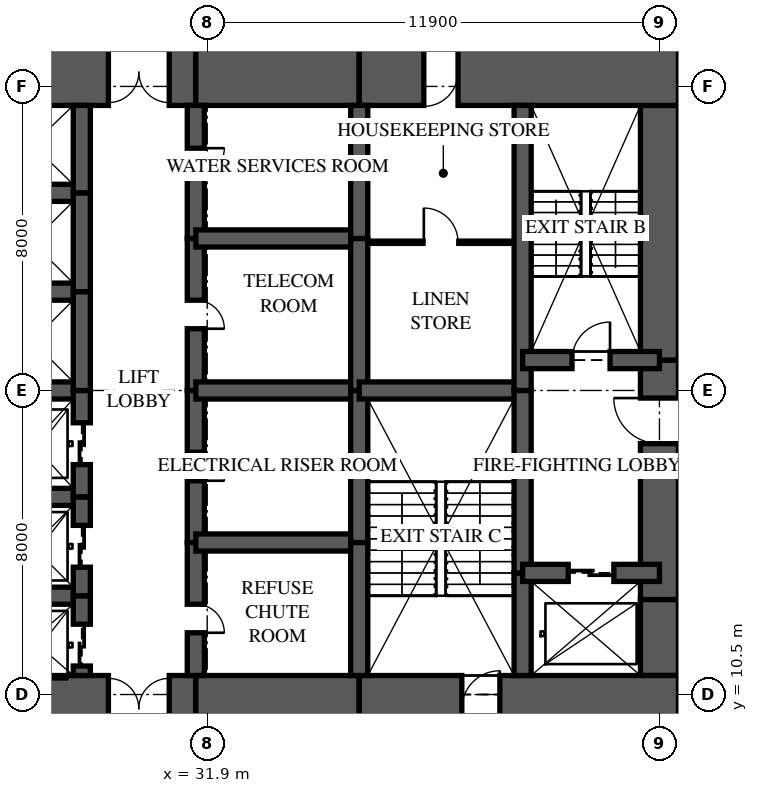
"""IFC4 building model, lengths in metres.
Left out: names, types, materials, properties, quantities, classifications, styles, units other than length and angle.
Written with IfcOpenShell. Run it as: python <this file> out.ifc"""

import sys

from ifc_helpers import new_model, si_unit, direction, frame, frame_2d, origin, place, context, subcontext, project, spatial, rectangle, extrude, element, fill, save


model = new_model("IFC4")
c1 = context("Model", 3, precision=1e-05, world=origin(), true_north=direction((0.0, 1.0)))
c2 = subcontext(c1, "Body", "Model", "MODEL_VIEW")
j1 = project(units=[si_unit("LENGTHUNIT", "METRE"), si_unit("PLANEANGLEUNIT", "RADIAN")], contexts=[c1])
p1 = place(None, origin())
s1 = spatial("IfcSite", under=j1, at=p1, CompositionType="ELEMENT")
p2 = place(p1, origin())
s2 = spatial("IfcBuilding", under=s1, at=p2, CompositionType="ELEMENT")
p3 = place(p2, frame((0.0, 0.0, 11.0)))
s3 = spatial("IfcBuildingStorey", under=s2, at=p3, CompositionType="ELEMENT", Elevation=11.0)
p4 = place(p3, frame((26.0, 10.125, 0.0), z_axis=(0.0, 0.0, 1.0), x_axis=(1.0, 0.0, 0.0)))
e1 = element("IfcWall", 1, at=p4, inside=s3, PredefinedType="SHEAR", context=c2, shape_type="SweptSolid", body=[
    extrude(rectangle(XDim=5.6, YDim=1.75, at=frame_2d((2.8, 0.0))), origin(), (0.0, 0.0, 1.0), 5.0),
])
p5 = place(p4, frame((3.3, 0.0, 0.0)))
e2 = element("IfcOpeningElement", 2, at=p5, cuts=e1, PredefinedType="OPENING", context=c2, shape_type="SweptSolid", body=[
    extrude(rectangle(XDim=1.6, YDim=2.1, at=frame_2d((0.8, 1.05))), frame((0.0, 0.885, 0.0), z_axis=(0.0, -1.0, 0.0), x_axis=(1.0, 0.0, 0.0)), (0.0, 0.0, 1.0), 1.77),
])
p6 = place(p3, frame((31.6, 10.125, 0.0), z_axis=(0.0, 0.0, 1.0), x_axis=(1.0, 0.0, 0.0)))
e3 = element("IfcWall", 3, at=p6, inside=s3, PredefinedType="SHEAR", context=c2, shape_type="SweptSolid", body=[
    extrude(rectangle(XDim=4.3, YDim=1.75, at=frame_2d((2.15, 0.0))), origin(), (0.0, 0.0, 1.0), 5.0),
])
p7 = place(p3, frame((35.9, 10.125, 0.0), z_axis=(0.0, 0.0, 1.0), x_axis=(1.0, 0.0, 0.0)))
e4 = element("IfcWall", 4, at=p7, inside=s3, PredefinedType="SHEAR", context=c2, shape_type="SweptSolid", body=[
    extrude(rectangle(XDim=8.4, YDim=1.75, at=frame_2d((4.2, 0.0))), origin(), (0.0, 0.0, 1.0), 5.0),
])
p8 = place(p7, frame((2.7, 0.0, 0.0)))
e5 = element("IfcOpeningElement", 5, at=p8, cuts=e4, PredefinedType="OPENING", context=c2, shape_type="SweptSolid", body=[
    extrude(rectangle(XDim=1.0, YDim=2.1, at=frame_2d((0.5, 1.05))), frame((0.0, 0.885, 0.0), z_axis=(0.0, -1.0, 0.0), x_axis=(1.0, 0.0, 0.0)), (0.0, 0.0, 1.0), 1.77),
])
p9 = place(p3, frame((44.3, 26.875, 0.0), z_axis=(0.0, 0.0, 1.0), x_axis=(-1.0, 0.0, 0.0)))
e6 = element("IfcWall", 6, at=p9, inside=s3, PredefinedType="SHEAR", context=c2, shape_type="SweptSolid", body=[
    extrude(rectangle(XDim=8.4, YDim=1.75, at=frame_2d((4.2, 0.0))), origin(), (0.0, 0.0, 1.0), 5.0),
])
p10 = place(p9, frame((5.8, 0.0, 0.0)))
e7 = element("IfcOpeningElement", 7, at=p10, cuts=e6, PredefinedType="OPENING", context=c2, shape_type="SweptSolid", body=[
    extrude(rectangle(XDim=0.9, YDim=2.1, at=frame_2d((0.45, 1.05))), frame((0.0, 0.885, 0.0), z_axis=(0.0, -1.0, 0.0), x_axis=(1.0, 0.0, 0.0)), (0.0, 0.0, 1.0), 1.77),
])
p11 = place(p3, frame((35.9, 26.875, 0.0), z_axis=(0.0, 0.0, 1.0), x_axis=(-1.0, 0.0, 0.0)))
e8 = element("IfcWall", 8, at=p11, inside=s3, PredefinedType="SHEAR", context=c2, shape_type="SweptSolid", body=[
    extrude(rectangle(XDim=4.3, YDim=1.75, at=frame_2d((2.15, 0.0))), origin(), (0.0, 0.0, 1.0), 5.0),
])
p12 = place(p3, frame((31.6, 26.875, 0.0), z_axis=(0.0, 0.0, 1.0), x_axis=(-1.0, 0.0, 0.0)))
e9 = element("IfcWall", 9, at=p12, inside=s3, PredefinedType="SHEAR", context=c2, shape_type="SweptSolid", body=[
    extrude(rectangle(XDim=5.6, YDim=1.75, at=frame_2d((2.8, 0.0))), origin(), (0.0, 0.0, 1.0), 5.0),
])
p13 = place(p12, frame((0.7, 0.0, 0.0)))
e10 = element("IfcOpeningElement", 10, at=p13, cuts=e9, PredefinedType="OPENING", context=c2, shape_type="SweptSolid", body=[
    extrude(rectangle(XDim=1.6, YDim=2.1, at=frame_2d((0.8, 1.05))), frame((0.0, 0.885, 0.0), z_axis=(0.0, -1.0, 0.0), x_axis=(1.0, 0.0, 0.0)), (0.0, 0.0, 1.0), 1.77),
])
p14 = place(p3, frame((43.8, 11.0, 0.0), z_axis=(0.0, 0.0, 1.0), x_axis=(0.0, 1.0, 0.0)))
e11 = element("IfcWall", 11, at=p14, inside=s3, PredefinedType="SHEAR", context=c2, shape_type="SweptSolid", body=[
    extrude(rectangle(XDim=2.0, YDim=1.0, at=frame_2d((1.0, 0.0))), origin(), (0.0, 0.0, 1.0), 5.0),
])
p15 = place(p3, frame((43.8, 13.0, 0.0), z_axis=(0.0, 0.0, 1.0), x_axis=(0.0, 1.0, 0.0)))
e12 = element("IfcWall", 12, at=p15, inside=s3, PredefinedType="SHEAR", context=c2, shape_type="SweptSolid", body=[
    extrude(rectangle(XDim=6.3, YDim=1.0, at=frame_2d((3.15, 0.0))), origin(), (0.0, 0.0, 1.0), 5.0),
])
p16 = place(p15, frame((4.1, 0.0, 0.0)))
e13 = element("IfcOpeningElement", 13, at=p16, cuts=e12, PredefinedType="OPENING", context=c2, shape_type="SweptSolid", body=[
    extrude(rectangle(XDim=1.2, YDim=2.2, at=frame_2d((0.6, 1.1))), frame((0.0, 0.51, 0.0), z_axis=(0.0, -1.0, 0.0), x_axis=(1.0, 0.0, 0.0)), (0.0, 0.0, 1.0), 1.02),
])
p17 = place(p3, frame((43.8, 19.3, 0.0), z_axis=(0.0, 0.0, 1.0), x_axis=(0.0, 1.0, 0.0)))
e14 = element("IfcWall", 14, at=p17, inside=s3, PredefinedType="SHEAR", context=c2, shape_type="SweptSolid", body=[
    extrude(rectangle(XDim=6.7, YDim=1.0, at=frame_2d((3.35, 0.0))), origin(), (0.0, 0.0, 1.0), 5.0),
])
p18 = place(p3, frame((28.6, 11.0, 0.0), z_axis=(0.0, 0.0, 1.0), x_axis=(0.0, 1.0, 0.0)))
e15 = element("IfcWall", 15, at=p18, inside=s3, PredefinedType="SHEAR", context=c2, shape_type="SweptSolid", body=[
    extrude(rectangle(XDim=2.1, YDim=0.45, at=frame_2d((1.05, 0.0))), origin(), (0.0, 0.0, 1.0), 5.0),
])
p19 = place(p18, frame((0.25, 0.0, 0.0)))
e16 = element("IfcOpeningElement", 16, at=p19, cuts=e15, PredefinedType="OPENING", context=c2, shape_type="SweptSolid", body=[
    extrude(rectangle(XDim=1.1, YDim=2.1, at=frame_2d((0.55, 1.05))), frame((0.0, 0.235, 0.0), z_axis=(0.0, -1.0, 0.0), x_axis=(1.0, 0.0, 0.0)), (0.0, 0.0, 1.0), 0.47),
])
p20 = place(p3, frame((28.6, 13.1, 0.0), z_axis=(0.0, 0.0, 1.0), x_axis=(0.0, 1.0, 0.0)))
e17 = element("IfcWall", 17, at=p20, inside=s3, PredefinedType="SHEAR", context=c2, shape_type="SweptSolid", body=[
    extrude(rectangle(XDim=2.6, YDim=0.45, at=frame_2d((1.3, 0.0))), origin(), (0.0, 0.0, 1.0), 5.0),
])
p21 = place(p20, frame((0.75, 0.0, 0.0)))
e18 = element("IfcOpeningElement", 18, at=p21, cuts=e17, PredefinedType="OPENING", context=c2, shape_type="SweptSolid", body=[
    extrude(rectangle(XDim=1.1, YDim=2.1, at=frame_2d((0.55, 1.05))), frame((0.0, 0.235, 0.0), z_axis=(0.0, -1.0, 0.0), x_axis=(1.0, 0.0, 0.0)), (0.0, 0.0, 1.0), 0.47),
])
p22 = place(p3, frame((28.6, 15.7, 0.0), z_axis=(0.0, 0.0, 1.0), x_axis=(0.0, 1.0, 0.0)))
e19 = element("IfcWall", 19, at=p22, inside=s3, PredefinedType="SHEAR", context=c2, shape_type="SweptSolid", body=[
    extrude(rectangle(XDim=2.8, YDim=0.45, at=frame_2d((1.4, 0.0))), origin(), (0.0, 0.0, 1.0), 5.0),
])
p23 = place(p22, frame((0.85, 0.0, 0.0)))
e20 = element("IfcOpeningElement", 20, at=p23, cuts=e19, PredefinedType="OPENING", context=c2, shape_type="SweptSolid", body=[
    extrude(rectangle(XDim=1.1, YDim=2.1, at=frame_2d((0.55, 1.05))), frame((0.0, 0.235, 0.0), z_axis=(0.0, -1.0, 0.0), x_axis=(1.0, 0.0, 0.0)), (0.0, 0.0, 1.0), 0.47),
])
p24 = place(p3, frame((28.6, 18.5, 0.0), z_axis=(0.0, 0.0, 1.0), x_axis=(0.0, 1.0, 0.0)))
e21 = element("IfcWall", 21, at=p24, inside=s3, PredefinedType="SHEAR", context=c2, shape_type="SweptSolid", body=[
    extrude(rectangle(XDim=2.6, YDim=0.45, at=frame_2d((1.3, 0.0))), origin(), (0.0, 0.0, 1.0), 5.0),
])
p25 = place(p3, frame((28.6, 21.1, 0.0), z_axis=(0.0, 0.0, 1.0), x_axis=(0.0, 1.0, 0.0)))
e22 = element("IfcWall", 22, at=p25, inside=s3, PredefinedType="SHEAR", context=c2, shape_type="SweptSolid", body=[
    extrude(rectangle(XDim=2.6, YDim=0.45, at=frame_2d((1.3, 0.0))), origin(), (0.0, 0.0, 1.0), 5.0),
])
p26 = place(p3, frame((28.6, 23.7, 0.0), z_axis=(0.0, 0.0, 1.0), x_axis=(0.0, 1.0, 0.0)))
e23 = element("IfcWall", 23, at=p26, inside=s3, PredefinedType="SHEAR", context=c2, shape_type="SweptSolid", body=[
    extrude(rectangle(XDim=2.3, YDim=0.45, at=frame_2d((1.15, 0.0))), origin(), (0.0, 0.0, 1.0), 5.0),
])
p27 = place(p3, frame((31.6, 11.0, 0.0), z_axis=(0.0, 0.0, 1.0), x_axis=(0.0, 1.0, 0.0)))
e24 = element("IfcWall", 24, at=p27, inside=s3, PredefinedType="SHEAR", context=c2, shape_type="SweptSolid", body=[
    extrude(rectangle(XDim=3.5, YDim=0.45, at=frame_2d((1.75, 0.0))), origin(), (0.0, 0.0, 1.0), 5.0),
])
p28 = place(p27, frame((1.125, 0.0, 0.0)))
e25 = element("IfcOpeningElement", 25, at=p28, cuts=e24, PredefinedType="OPENING", context=c2, shape_type="SweptSolid", body=[
    extrude(rectangle(XDim=0.75, YDim=2.1, at=frame_2d((0.375, 1.05))), frame((0.0, 0.235, 0.0), z_axis=(0.0, -1.0, 0.0), x_axis=(1.0, 0.0, 0.0)), (0.0, 0.0, 1.0), 0.47),
])
p29 = place(p3, frame((31.6, 14.5, 0.0), z_axis=(0.0, 0.0, 1.0), x_axis=(0.0, 1.0, 0.0)))
e26 = element("IfcWall", 26, at=p29, inside=s3, PredefinedType="SHEAR", context=c2, shape_type="SweptSolid", body=[
    extrude(rectangle(XDim=4.0, YDim=0.45, at=frame_2d((2.0, 0.0))), origin(), (0.0, 0.0, 1.0), 5.0),
])
p30 = place(p29, frame((1.625, 0.0, 0.0)))
e27 = element("IfcOpeningElement", 27, at=p30, cuts=e26, PredefinedType="OPENING", context=c2, shape_type="SweptSolid", body=[
    extrude(rectangle(XDim=0.75, YDim=2.1, at=frame_2d((0.375, 1.05))), frame((0.0, 0.235, 0.0), z_axis=(0.0, -1.0, 0.0), x_axis=(1.0, 0.0, 0.0)), (0.0, 0.0, 1.0), 0.47),
])
p31 = place(p3, frame((31.6, 18.5, 0.0), z_axis=(0.0, 0.0, 1.0), x_axis=(0.0, 1.0, 0.0)))
e28 = element("IfcWall", 28, at=p31, inside=s3, PredefinedType="SHEAR", context=c2, shape_type="SweptSolid", body=[
    extrude(rectangle(XDim=4.0, YDim=0.45, at=frame_2d((2.0, 0.0))), origin(), (0.0, 0.0, 1.0), 5.0),
])
p32 = place(p31, frame((1.625, 0.0, 0.0)))
e29 = element("IfcOpeningElement", 29, at=p32, cuts=e28, PredefinedType="OPENING", context=c2, shape_type="SweptSolid", body=[
    extrude(rectangle(XDim=0.75, YDim=2.1, at=frame_2d((0.375, 1.05))), frame((0.0, 0.235, 0.0), z_axis=(0.0, -1.0, 0.0), x_axis=(1.0, 0.0, 0.0)), (0.0, 0.0, 1.0), 0.47),
])
p33 = place(p3, frame((31.6, 22.5, 0.0), z_axis=(0.0, 0.0, 1.0), x_axis=(0.0, 1.0, 0.0)))
e30 = element("IfcWall", 30, at=p33, inside=s3, PredefinedType="SHEAR", context=c2, shape_type="SweptSolid", body=[
    extrude(rectangle(XDim=3.5, YDim=0.45, at=frame_2d((1.75, 0.0))), origin(), (0.0, 0.0, 1.0), 5.0),
])
p34 = place(p33, frame((1.625, 0.0, 0.0)))
e31 = element("IfcOpeningElement", 31, at=p34, cuts=e30, PredefinedType="OPENING", context=c2, shape_type="SweptSolid", body=[
    extrude(rectangle(XDim=0.75, YDim=2.1, at=frame_2d((0.375, 1.05))), frame((0.0, 0.235, 0.0), z_axis=(0.0, -1.0, 0.0), x_axis=(1.0, 0.0, 0.0)), (0.0, 0.0, 1.0), 0.47),
])
p35 = place(p3, frame((35.9, 11.0, 0.0), z_axis=(0.0, 0.0, 1.0), x_axis=(0.0, 1.0, 0.0)))
e32 = element("IfcWall", 32, at=p35, inside=s3, PredefinedType="SHEAR", context=c2, shape_type="SweptSolid", body=[
    extrude(rectangle(XDim=3.5, YDim=0.45, at=frame_2d((1.75, 0.0))), origin(), (0.0, 0.0, 1.0), 5.0),
])
for number, where, z_axis, x_axis in (
    (33, (35.9, 14.5, 0.0), (0.0, 0.0, 1.0), (0.0, 1.0, 0.0)),
    (34, (35.9, 18.5, 0.0), (0.0, 0.0, 1.0), (0.0, 1.0, 0.0)),
):
    element("IfcWall", number, at=place(p3, frame(where, z_axis=z_axis, x_axis=x_axis)), inside=s3, PredefinedType="SHEAR", context=c2, shape_type="SweptSolid", body=[
        extrude(rectangle(XDim=4.0, YDim=0.45, at=frame_2d((2.0, 0.0))), origin(), (0.0, 0.0, 1.0), 5.0),
    ])
p36 = place(p3, frame((35.9, 22.5, 0.0), z_axis=(0.0, 0.0, 1.0), x_axis=(0.0, 1.0, 0.0)))
e35 = element("IfcWall", 35, at=p36, inside=s3, PredefinedType="SHEAR", context=c2, shape_type="SweptSolid", body=[
    extrude(rectangle(XDim=3.5, YDim=0.45, at=frame_2d((1.75, 0.0))), origin(), (0.0, 0.0, 1.0), 5.0),
])
p37 = place(p3, frame((40.2, 11.0, 0.0), z_axis=(0.0, 0.0, 1.0), x_axis=(0.0, 1.0, 0.0)))
e36 = element("IfcWall", 36, at=p37, inside=s3, PredefinedType="SHEAR", context=c2, shape_type="SweptSolid", body=[
    extrude(rectangle(XDim=2.7, YDim=0.45, at=frame_2d((1.35, 0.0))), origin(), (0.0, 0.0, 1.0), 5.0),
])
p38 = place(p3, frame((40.2, 13.7, 0.0), z_axis=(0.0, 0.0, 1.0), x_axis=(0.0, 1.0, 0.0)))
e37 = element("IfcWall", 37, at=p38, inside=s3, PredefinedType="SHEAR", context=c2, shape_type="SweptSolid", body=[
    extrude(rectangle(XDim=4.8, YDim=0.45, at=frame_2d((2.4, 0.0))), origin(), (0.0, 0.0, 1.0), 5.0),
])
p39 = place(p3, frame((40.2, 18.5, 0.0), z_axis=(0.0, 0.0, 1.0), x_axis=(0.0, 1.0, 0.0)))
e38 = element("IfcWall", 38, at=p39, inside=s3, PredefinedType="SHEAR", context=c2, shape_type="SweptSolid", body=[
    extrude(rectangle(XDim=7.5, YDim=0.45, at=frame_2d((3.75, 0.0))), origin(), (0.0, 0.0, 1.0), 5.0),
])
for number, where, z_axis, x_axis in (
    (39, (26.0, 13.1, 0.0), (0.0, 0.0, 1.0), (1.0, 0.0, 0.0)),
    (40, (26.0, 15.7, 0.0), (0.0, 0.0, 1.0), (1.0, 0.0, 0.0)),
    (41, (26.0, 18.5, 0.0), (0.0, 0.0, 1.0), (1.0, 0.0, 0.0)),
    (42, (26.0, 21.1, 0.0), (0.0, 0.0, 1.0), (1.0, 0.0, 0.0)),
    (43, (26.0, 23.7, 0.0), (0.0, 0.0, 1.0), (1.0, 0.0, 0.0)),
):
    element("IfcWall", number, at=place(p3, frame(where, z_axis=z_axis, x_axis=x_axis)), inside=s3, PredefinedType="SHEAR", context=c2, shape_type="SweptSolid", body=[
        extrude(rectangle(XDim=2.6, YDim=0.45, at=frame_2d((1.3, 0.0))), origin(), (0.0, 0.0, 1.0), 5.0),
    ])
for number, where, z_axis, x_axis in (
    (44, (31.6, 14.5, 0.0), (0.0, 0.0, 1.0), (1.0, 0.0, 0.0)),
    (45, (31.6, 18.5, 0.0), (0.0, 0.0, 1.0), (1.0, 0.0, 0.0)),
    (46, (31.6, 22.5, 0.0), (0.0, 0.0, 1.0), (1.0, 0.0, 0.0)),
):
    element("IfcWall", number, at=place(p3, frame(where, z_axis=z_axis, x_axis=x_axis)), inside=s3, PredefinedType="SHEAR", context=c2, shape_type="SweptSolid", body=[
        extrude(rectangle(XDim=4.3, YDim=0.45, at=frame_2d((2.15, 0.0))), origin(), (0.0, 0.0, 1.0), 5.0),
    ])
p40 = place(p3, frame((35.9, 18.5, 0.0), z_axis=(0.0, 0.0, 1.0), x_axis=(1.0, 0.0, 0.0)))
e47 = element("IfcWall", 47, at=p40, inside=s3, PredefinedType="SHEAR", context=c2, shape_type="SweptSolid", body=[
    extrude(rectangle(XDim=4.3, YDim=0.45, at=frame_2d((2.15, 0.0))), origin(), (0.0, 0.0, 1.0), 5.0),
])
p41 = place(p3, frame((40.2, 13.7, 0.0), z_axis=(0.0, 0.0, 1.0), x_axis=(1.0, 0.0, 0.0)))
e48 = element("IfcWall", 48, at=p41, inside=s3, PredefinedType="SHEAR", context=c2, shape_type="SweptSolid", body=[
    extrude(rectangle(XDim=3.6, YDim=0.45, at=frame_2d((1.8, 0.0))), origin(), (0.0, 0.0, 1.0), 5.0),
])
p42 = place(p41, frame((1.2, 0.0, 0.0)))
e49 = element("IfcOpeningElement", 49, at=p42, cuts=e48, PredefinedType="OPENING", context=c2, shape_type="SweptSolid", body=[
    extrude(rectangle(XDim=1.2, YDim=2.1, at=frame_2d((0.6, 1.05))), frame((0.0, 0.235, 0.0), z_axis=(0.0, -1.0, 0.0), x_axis=(1.0, 0.0, 0.0)), (0.0, 0.0, 1.0), 0.47),
])
p43 = place(p3, frame((40.2, 19.3, 0.0), z_axis=(0.0, 0.0, 1.0), x_axis=(1.0, 0.0, 0.0)))
e50 = element("IfcWall", 50, at=p43, inside=s3, PredefinedType="SHEAR", context=c2, shape_type="SweptSolid", body=[
    extrude(rectangle(XDim=3.6, YDim=0.45, at=frame_2d((1.8, 0.0))), origin(), (0.0, 0.0, 1.0), 5.0),
])
p44 = place(p43, frame((1.3, 0.0, 0.0)))
e51 = element("IfcOpeningElement", 51, at=p44, cuts=e50, PredefinedType="OPENING", context=c2, shape_type="SweptSolid", body=[
    extrude(rectangle(XDim=1.0, YDim=2.1, at=frame_2d((0.5, 1.05))), frame((0.0, 0.235, 0.0), z_axis=(0.0, -1.0, 0.0), x_axis=(1.0, 0.0, 0.0)), (0.0, 0.0, 1.0), 0.47),
])
p45 = place(p3, frame((36.125, 22.4, 0.0), z_axis=(0.0, 0.0, 1.0), x_axis=(1.0, 0.0, 0.0)))
e52 = element("IfcWall", 52, at=p45, inside=s3, PredefinedType="PARTITIONING", context=c2, shape_type="SweptSolid", body=[
    extrude(rectangle(XDim=3.85, YDim=0.1, at=frame_2d((1.925, 0.0))), origin(), (0.0, 0.0, 1.0), 4.72),
])
p46 = place(p45, frame((1.475, 0.0, 0.0)))
e53 = element("IfcOpeningElement", 53, at=p46, cuts=e52, PredefinedType="OPENING", context=c2, shape_type="SweptSolid", body=[
    extrude(rectangle(XDim=0.9, YDim=2.1, at=frame_2d((0.45, 1.05))), frame((0.0, 0.06, 0.0), z_axis=(0.0, -1.0, 0.0), x_axis=(1.0, 0.0, 0.0)), (0.0, 0.0, 1.0), 0.12),
])
p47 = place(p46, origin())
e54 = element("IfcDoor", 54, at=p47, inside=s3, OperationType="SINGLE_SWING_LEFT", PredefinedType="DOOR", context=c2, shape_type="SweptSolid", body=[
    extrude(rectangle(XDim=0.9, YDim=2.1, at=frame_2d((0.45, 1.05))), frame((0.0, 0.025, 0.0), z_axis=(0.0, -1.0, 0.0), x_axis=(1.0, 0.0, 0.0)), (0.0, 0.0, 1.0), 0.05),
])
fill(e53, e54)
p48 = place(p44, origin())
e55 = element("IfcDoor", 55, at=p48, inside=s3, OperationType="SINGLE_SWING_RIGHT", PredefinedType="DOOR", context=c2, shape_type="SweptSolid", body=[
    extrude(rectangle(XDim=1.0, YDim=2.1, at=frame_2d((0.5, 1.05))), frame((0.0, 0.025, 0.0), z_axis=(0.0, -1.0, 0.0), x_axis=(1.0, 0.0, 0.0)), (0.0, 0.0, 1.0), 0.05),
])
fill(e51, e55)
p49 = place(p16, origin())
e56 = element("IfcDoor", 56, at=p49, inside=s3, OperationType="SINGLE_SWING_RIGHT", PredefinedType="DOOR", context=c2, shape_type="SweptSolid", body=[
    extrude(rectangle(XDim=1.2, YDim=2.2, at=frame_2d((0.6, 1.1))), frame((0.0, 0.025, 0.0), z_axis=(0.0, -1.0, 0.0), x_axis=(1.0, 0.0, 0.0)), (0.0, 0.0, 1.0), 0.05),
])
fill(e13, e56)
p50 = place(p42, origin())
e57 = element("IfcDoor", 57, at=p50, inside=s3, OperationType="SLIDING_TO_LEFT", PredefinedType="DOOR", context=c2, shape_type="SweptSolid", body=[
    extrude(rectangle(XDim=1.2, YDim=2.1, at=frame_2d((0.6, 1.05))), frame((0.0, 0.025, 0.0), z_axis=(0.0, -1.0, 0.0), x_axis=(1.0, 0.0, 0.0)), (0.0, 0.0, 1.0), 0.05),
])
fill(e49, e57)
p51 = place(p19, origin())
e58 = element("IfcDoor", 58, at=p51, inside=s3, OperationType="SLIDING_TO_LEFT", PredefinedType="DOOR", context=c2, shape_type="SweptSolid", body=[
    extrude(rectangle(XDim=1.1, YDim=2.1, at=frame_2d((0.55, 1.05))), frame((0.0, 0.025, 0.0), z_axis=(0.0, -1.0, 0.0), x_axis=(1.0, 0.0, 0.0)), (0.0, 0.0, 1.0), 0.05),
])
fill(e16, e58)
p52 = place(p21, origin())
e59 = element("IfcDoor", 59, at=p52, inside=s3, OperationType="SLIDING_TO_LEFT", PredefinedType="DOOR", context=c2, shape_type="SweptSolid", body=[
    extrude(rectangle(XDim=1.1, YDim=2.1, at=frame_2d((0.55, 1.05))), frame((0.0, 0.025, 0.0), z_axis=(0.0, -1.0, 0.0), x_axis=(1.0, 0.0, 0.0)), (0.0, 0.0, 1.0), 0.05),
])
fill(e18, e59)
p53 = place(p23, origin())
e60 = element("IfcDoor", 60, at=p53, inside=s3, OperationType="SLIDING_TO_LEFT", PredefinedType="DOOR", context=c2, shape_type="SweptSolid", body=[
    extrude(rectangle(XDim=1.1, YDim=2.1, at=frame_2d((0.55, 1.05))), frame((0.0, 0.025, 0.0), z_axis=(0.0, -1.0, 0.0), x_axis=(1.0, 0.0, 0.0)), (0.0, 0.0, 1.0), 0.05),
])
fill(e20, e60)
p54 = place(p5, origin())
e61 = element("IfcDoor", 61, at=p54, inside=s3, OperationType="DOUBLE_DOOR_SINGLE_SWING", PredefinedType="DOOR", context=c2, shape_type="SweptSolid", body=[
    extrude(rectangle(XDim=1.6, YDim=2.1, at=frame_2d((0.8, 1.05))), frame((0.0, 0.025, 0.0), z_axis=(0.0, -1.0, 0.0), x_axis=(1.0, 0.0, 0.0)), (0.0, 0.0, 1.0), 0.05),
])
fill(e2, e61)
p55 = place(p13, origin())
e62 = element("IfcDoor", 62, at=p55, inside=s3, OperationType="DOUBLE_DOOR_SINGLE_SWING", PredefinedType="DOOR", context=c2, shape_type="SweptSolid", body=[
    extrude(rectangle(XDim=1.6, YDim=2.1, at=frame_2d((0.8, 1.05))), frame((0.0, 0.025, 0.0), z_axis=(0.0, -1.0, 0.0), x_axis=(1.0, 0.0, 0.0)), (0.0, 0.0, 1.0), 0.05),
])
fill(e10, e62)
p56 = place(p28, frame((0.75, 0.0, 0.0), z_axis=(0.0, 0.0, 1.0), x_axis=(-1.0, 0.0, 0.0)))
e63 = element("IfcDoor", 63, at=p56, inside=s3, OperationType="SINGLE_SWING_RIGHT", PredefinedType="DOOR", context=c2, shape_type="SweptSolid", body=[
    extrude(rectangle(XDim=0.75, YDim=2.1, at=frame_2d((0.375, 1.05))), frame((0.0, 0.025, 0.0), z_axis=(0.0, -1.0, 0.0), x_axis=(1.0, 0.0, 0.0)), (0.0, 0.0, 1.0), 0.05),
])
fill(e25, e63)
p57 = place(p30, frame((0.75, 0.0, 0.0), z_axis=(0.0, 0.0, 1.0), x_axis=(-1.0, 0.0, 0.0)))
e64 = element("IfcDoor", 64, at=p57, inside=s3, OperationType="SINGLE_SWING_RIGHT", PredefinedType="DOOR", context=c2, shape_type="SweptSolid", body=[
    extrude(rectangle(XDim=0.75, YDim=2.1, at=frame_2d((0.375, 1.05))), frame((0.0, 0.025, 0.0), z_axis=(0.0, -1.0, 0.0), x_axis=(1.0, 0.0, 0.0)), (0.0, 0.0, 1.0), 0.05),
])
fill(e27, e64)
p58 = place(p32, frame((0.75, 0.0, 0.0), z_axis=(0.0, 0.0, 1.0), x_axis=(-1.0, 0.0, 0.0)))
e65 = element("IfcDoor", 65, at=p58, inside=s3, OperationType="SINGLE_SWING_RIGHT", PredefinedType="DOOR", context=c2, shape_type="SweptSolid", body=[
    extrude(rectangle(XDim=0.75, YDim=2.1, at=frame_2d((0.375, 1.05))), frame((0.0, 0.025, 0.0), z_axis=(0.0, -1.0, 0.0), x_axis=(1.0, 0.0, 0.0)), (0.0, 0.0, 1.0), 0.05),
])
fill(e29, e65)
p59 = place(p34, frame((0.75, 0.0, 0.0), z_axis=(0.0, 0.0, 1.0), x_axis=(-1.0, 0.0, 0.0)))
e66 = element("IfcDoor", 66, at=p59, inside=s3, OperationType="SINGLE_SWING_LEFT", PredefinedType="DOOR", context=c2, shape_type="SweptSolid", body=[
    extrude(rectangle(XDim=0.75, YDim=2.1, at=frame_2d((0.375, 1.05))), frame((0.0, 0.025, 0.0), z_axis=(0.0, -1.0, 0.0), x_axis=(1.0, 0.0, 0.0)), (0.0, 0.0, 1.0), 0.05),
])
fill(e31, e66)
p60 = place(p8, origin())
e67 = element("IfcDoor", 67, at=p60, inside=s3, OperationType="SINGLE_SWING_RIGHT", PredefinedType="DOOR", context=c2, shape_type="SweptSolid", body=[
    extrude(rectangle(XDim=1.0, YDim=2.1, at=frame_2d((0.5, 1.05))), frame((0.0, 0.025, 0.0), z_axis=(0.0, -1.0, 0.0), x_axis=(1.0, 0.0, 0.0)), (0.0, 0.0, 1.0), 0.05),
])
fill(e5, e67)
p61 = place(p10, origin())
e68 = element("IfcDoor", 68, at=p61, inside=s3, OperationType="SINGLE_SWING_RIGHT", PredefinedType="DOOR", context=c2, shape_type="SweptSolid", body=[
    extrude(rectangle(XDim=0.9, YDim=2.1, at=frame_2d((0.45, 1.05))), frame((0.0, 0.47, 0.0), z_axis=(0.0, -1.0, 0.0), x_axis=(1.0, 0.0, 0.0)), (0.0, 0.0, 1.0), 0.8),
])
fill(e7, e68)
save(model, sys.argv[1])
